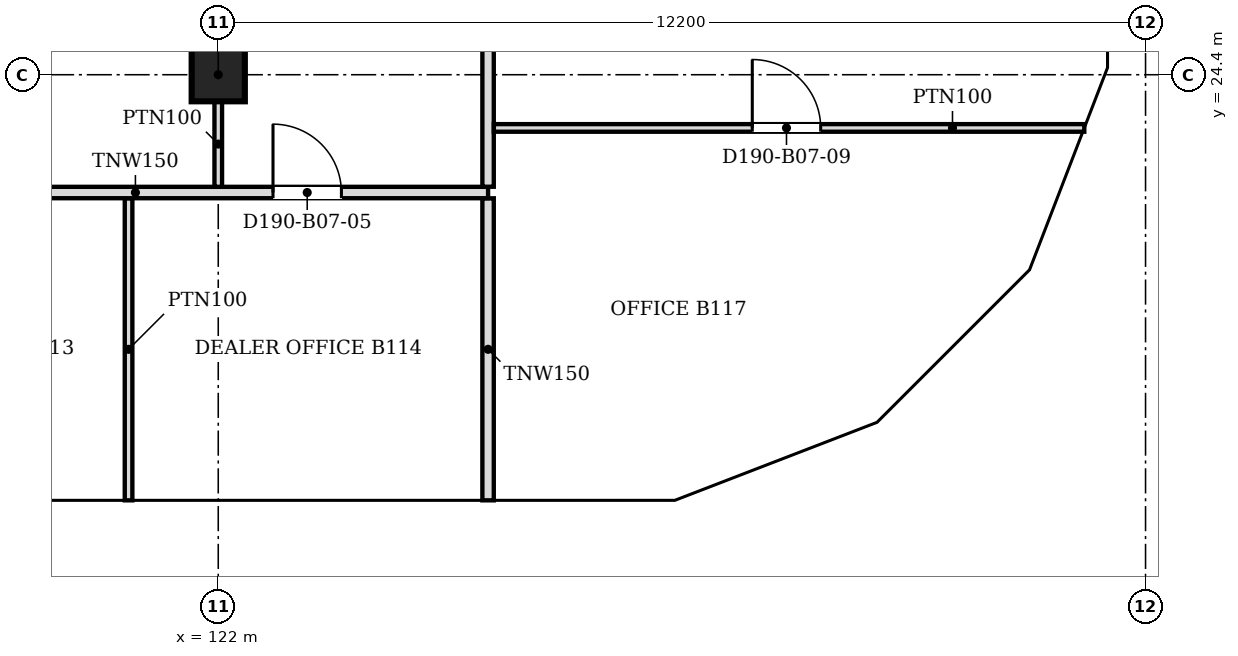
"""IFC4 building model, lengths in metres.
Left out: names, types, materials, properties, quantities, classifications, styles, units other than length and angle.
Written with IfcOpenShell. Run it as: python <this file> out.ifc"""

import sys

from ifc_helpers import new_model, si_unit, direction, frame, frame_2d, origin, origin_2d, place, context, subcontext, project, spatial, polyline, rectangle, outline, extrude, faceted_brep, source, transform, mapped, element, fill, save


model = new_model("IFC4")
c1 = context("Model", 3, precision=1e-05, world=origin(), true_north=direction((0.0, 1.0)))
c2 = subcontext(c1, "Body", "Model", "MODEL_VIEW")
j1 = project(units=[si_unit("LENGTHUNIT", "METRE"), si_unit("PLANEANGLEUNIT", "RADIAN")], contexts=[c1])
p1 = place(None, origin())
s1 = spatial("IfcSite", under=j1, at=p1, CompositionType="ELEMENT")
p2 = place(p1, origin())
s2 = spatial("IfcBuilding", under=s1, at=p2, CompositionType="ELEMENT")
p3 = place(p2, frame((0.0, 0.0, 72.4)))
s3 = spatial("IfcBuildingStorey", under=s2, at=p3, CompositionType="ELEMENT", Elevation=72.4)
p4 = place(p3, frame((122.0, 24.4, 0.0), z_axis=(0.0, 0.0, 1.0), x_axis=(1.0, 0.0, 0.0)))
e1 = element("IfcColumn", 1, at=p4, inside=s3, PredefinedType="COLUMN", context=c2, shape_type="SweptSolid", body=[
    extrude(rectangle(XDim=0.7, YDim=0.7, at=origin_2d()), origin(), (0.0, 0.0, 1.0), 3.6),
])
m1 = source(origin(), c2, "Body", "SweptSolid", [
    extrude(outline(polyline([(3.05, 0.0), (6.1, 3.8), (3.05, 7.6), (0.0, 3.8), (3.05, 0.0)])), frame((0.0, 0.25, 0.0), z_axis=(0.0, -1.0, 0.0), x_axis=(1.0, 0.0, 0.0)), (0.0, 0.0, 1.0), 0.5),
])
p5 = place(p3, frame((115.9, 18.55, -3.8), z_axis=(0.0, 0.0, 1.0), x_axis=(1.0, 0.0, 0.0)))
e2 = element("IfcWall", 2, at=p5, inside=s3, PredefinedType="SOLIDWALL", context=c2, shape_type="MappedRepresentation", body=[
    mapped(m1, transform((0.0, 0.0, 0.0), scale=1.0)),
])
m2 = source(origin(), c2, "Body", "SweptSolid", [
    extrude(outline(polyline([(3.05, 0.399), (5.78, 3.8), (3.05, 7.2), (0.321, 3.8), (3.05, 0.399)])), frame((0.0, 0.26, 0.0), z_axis=(0.0, -1.0, 0.0), x_axis=(1.0, 0.0, 0.0)), (0.0, 0.0, 1.0), 0.52),
])
p6 = place(p5, origin())
e3 = element("IfcOpeningElement", 3, at=p6, cuts=e2, PredefinedType="OPENING", context=c2, shape_type="MappedRepresentation", body=[
    mapped(m2, transform((0.0, 0.0, 0.0), scale=1.0)),
])
m3 = source(origin(), c2, "Body", "Brep", [
    faceted_brep([(3.05, -0.25, 0.0), (6.053, -0.25, 3.8), (3.05, -0.25, 7.6), (0.0, -0.25, 3.8), (0.0, 0.25, 3.8), (3.05, 0.25, 7.6), (6.007, 0.25, 3.859), (6.007, 0.25, 3.741), (3.05, 0.25, 0.0), (6.053, 0.0, 3.8)], [[[0, 1, 2, 3]], [[4, 5, 6, 7, 8]], [[8, 7, 9, 1, 0]], [[6, 5, 2, 1, 9]], [[5, 4, 3, 2]], [[4, 8, 0, 3]], [[9, 7, 6]]]),
])
p7 = place(p3, frame((122.0, 18.55, -3.8), z_axis=(0.0, 0.0, 1.0), x_axis=(1.0, 0.0, 0.0)))
e4 = element("IfcWall", 4, at=p7, inside=s3, PredefinedType="SOLIDWALL", context=c2, shape_type="MappedRepresentation", body=[
    mapped(m3, transform((0.0, 0.0, 0.0), scale=1.0)),
])
m4 = source(origin(), c2, "Body", "SweptSolid", [
    extrude(outline(polyline([(3.049, 0.401), (5.735, 3.8), (3.049, 7.199), (0.321, 3.8), (3.049, 0.401)])), frame((0.0, 0.26, 0.0), z_axis=(0.0, -1.0, 0.0), x_axis=(1.0, 0.0, 0.0)), (0.0, 0.0, 1.0), 0.52),
])
p8 = place(p7, origin())
e5 = element("IfcOpeningElement", 5, at=p8, cuts=e4, PredefinedType="OPENING", context=c2, shape_type="MappedRepresentation", body=[
    mapped(m4, transform((0.0, 0.0, 0.0), scale=1.0)),
])
m5 = source(origin(), c2, "Body", "Brep", [
    faceted_brep([(2.95, -0.25, 0.0), (3.003, -0.25, 0.068), (3.003, -0.25, 7.531), (2.95, -0.25, 7.6), (0.0, -0.25, 3.8), (0.047, 0.25, 3.86), (2.898, 0.25, 7.532), (2.898, 0.25, 0.068), (0.047, 0.25, 3.74), (2.95, 0.0, 0.0), (2.95, 0.0, 7.6), (0.0, 0.0, 3.8)], [[[0, 1, 2, 3, 4]], [[5, 6, 7, 8]], [[1, 0, 9]], [[10, 3, 2]], [[6, 5, 11, 4, 3, 10]], [[8, 7, 9, 0, 4, 11]], [[8, 11, 5]], [[1, 9, 7, 6, 10, 2]]]),
])
p9 = place(p3, frame((128.053, 18.55, -3.8), z_axis=(0.0, 0.0, 1.0), x_axis=(0.933007896601, 0.359855894603, 0.0)))
e6 = element("IfcWall", 6, at=p9, inside=s3, PredefinedType="SOLIDWALL", context=c2, shape_type="MappedRepresentation", body=[
    mapped(m5, transform((0.0, 0.0, 0.0), scale=1.0)),
])
m6 = source(origin(), c2, "Body", "SweptSolid", [
    extrude(outline(polyline([(2.75, 6.935), (0.316, 3.8), (2.75, 0.665), (2.75, 6.935)])), frame((0.0, 0.26, 0.0), z_axis=(0.0, -1.0, 0.0), x_axis=(1.0, 0.0, 0.0)), (0.0, 0.0, 1.0), 0.52),
])
p10 = place(p9, origin())
e7 = element("IfcOpeningElement", 7, at=p10, cuts=e6, PredefinedType="OPENING", context=c2, shape_type="MappedRepresentation", body=[
    mapped(m6, transform((0.0, 0.0, 0.0), scale=1.0)),
])
m7 = source(origin(), c2, "Body", "Brep", [
    faceted_brep([(0.053, -0.25, 0.0), (2.997, -0.25, 3.8), (0.053, -0.25, 7.6), (0.0, -0.25, 7.532), (0.0, -0.25, 0.068), (0.106, 0.25, 7.531), (2.944, 0.25, 3.868), (2.944, 0.25, 3.732), (0.106, 0.25, 0.068), (2.997, 0.0, 3.8), (0.053, 0.0, 0.0), (0.053, 0.0, 7.6)], [[[0, 1, 2, 3, 4]], [[5, 6, 7, 8]], [[8, 7, 9, 1, 0, 10]], [[6, 5, 11, 2, 1, 9]], [[3, 2, 11]], [[10, 0, 4]], [[8, 10, 4, 3, 11, 5]], [[9, 7, 6]]]),
])
p11 = place(p3, frame((130.769, 19.574, -3.8), z_axis=(0.0, 0.0, 1.0), x_axis=(0.707106781187, 0.707106781187, 0.0)))
e8 = element("IfcWall", 8, at=p11, inside=s3, PredefinedType="SOLIDWALL", context=c2, shape_type="MappedRepresentation", body=[
    mapped(m7, transform((0.0, 0.0, 0.0), scale=1.0)),
])
m8 = source(origin(), c2, "Body", "SweptSolid", [
    extrude(outline(polyline([(0.253, 0.666), (2.681, 3.8), (0.253, 6.934), (0.253, 0.666)])), frame((0.0, 0.26, 0.0), z_axis=(0.0, -1.0, 0.0), x_axis=(1.0, 0.0, 0.0)), (0.0, 0.0, 1.0), 0.52),
])
p12 = place(p11, origin())
e9 = element("IfcOpeningElement", 9, at=p12, cuts=e8, PredefinedType="OPENING", context=c2, shape_type="MappedRepresentation", body=[
    mapped(m8, transform((0.0, 0.0, 0.0), scale=1.0)),
])
m9 = source(origin(), c2, "Body", "Brep", [
    faceted_brep([(2.95, -0.25, 0.0), (2.997, -0.25, 0.059), (2.997, -0.25, 7.541), (2.95, -0.25, 7.6), (0.0, -0.25, 3.8), (0.053, 0.25, 3.868), (2.904, 0.25, 7.54), (2.904, 0.25, 0.06), (0.053, 0.25, 3.732), (2.95, 0.0, 0.0), (2.95, 0.0, 7.6), (0.0, 0.0, 3.8)], [[[0, 1, 2, 3, 4]], [[5, 6, 7, 8]], [[1, 0, 9]], [[10, 3, 2]], [[6, 5, 11, 4, 3, 10]], [[8, 7, 9, 0, 4, 11]], [[8, 11, 5]], [[1, 9, 7, 6, 10, 2]]]),
])
p13 = place(p3, frame((132.888, 21.694, -3.8), z_axis=(0.0, 0.0, 1.0), x_axis=(0.359901446078, 0.932990326376, 0.0)))
e10 = element("IfcWall", 10, at=p13, inside=s3, PredefinedType="SOLIDWALL", context=c2, shape_type="MappedRepresentation", body=[
    mapped(m9, transform((0.0, 0.0, 0.0), scale=1.0)),
])
p14 = place(p13, origin())
e11 = element("IfcOpeningElement", 11, at=p14, cuts=e10, PredefinedType="OPENING", context=c2, shape_type="MappedRepresentation", body=[
    mapped(m6, transform((0.0, 0.0, 0.0), scale=1.0)),
])
m10 = source(origin(), c2, "Body", "Brep", [
    faceted_brep([(0.047, -0.25, 0.0), (3.05, -0.25, 3.8), (0.047, -0.25, 7.6), (0.0, -0.25, 7.54), (0.0, -0.25, 0.06), (0.093, 0.25, 7.541), (3.05, 0.25, 3.8), (0.093, 0.25, 0.059), (0.047, 0.0, 0.0), (0.047, 0.0, 7.6)], [[[0, 1, 2, 3, 4]], [[5, 6, 7]], [[7, 6, 1, 0, 8]], [[6, 5, 9, 2, 1]], [[3, 2, 9]], [[8, 0, 4]], [[7, 8, 4, 3, 9, 5]]]),
])
p15 = place(p3, frame((133.95, 24.4, -3.8), z_axis=(0.0, 0.0, 1.0), x_axis=(0.0, 1.0, 0.0)))
e12 = element("IfcWall", 12, at=p15, inside=s3, PredefinedType="SOLIDWALL", context=c2, shape_type="MappedRepresentation", body=[
    mapped(m10, transform((0.0, 0.0, 0.0), scale=1.0)),
])
m11 = source(origin(), c2, "Body", "SweptSolid", [
    extrude(outline(polyline([(0.247, 0.656), (2.731, 3.8), (0.247, 6.944), (0.247, 0.656)])), frame((0.0, 0.26, 0.0), z_axis=(0.0, -1.0, 0.0), x_axis=(1.0, 0.0, 0.0)), (0.0, 0.0, 1.0), 0.52),
])
p16 = place(p15, origin())
e13 = element("IfcOpeningElement", 13, at=p16, cuts=e12, PredefinedType="OPENING", context=c2, shape_type="MappedRepresentation", body=[
    mapped(m11, transform((0.0, 0.0, 0.0), scale=1.0)),
])
p17 = place(p2, frame((0.0, 0.0, 76.2)))
s4 = spatial("IfcBuildingStorey", under=s2, at=p17, CompositionType="ELEMENT", Elevation=76.2)
m12 = source(origin(), c2, "Body", "SweptSolid", [
    extrude(outline(polyline([(3.05, 0.0), (6.1, 3.8), (3.05, 7.6), (0.0, 3.8), (3.05, 0.0)])), frame((0.0, 0.25, 0.0), z_axis=(0.0, -1.0, 0.0), x_axis=(1.0, 0.0, 0.0)), (0.0, 0.0, 1.0), 0.5),
])
p18 = place(p17, frame((118.95, 18.55, -3.8), z_axis=(0.0, 0.0, 1.0), x_axis=(1.0, 0.0, 0.0)))
e14 = element("IfcWall", 14, at=p18, inside=s4, PredefinedType="SOLIDWALL", context=c2, shape_type="MappedRepresentation", body=[
    mapped(m12, transform((0.0, 0.0, 0.0), scale=1.0)),
])
m13 = source(origin(), c2, "Body", "SweptSolid", [
    extrude(outline(polyline([(3.05, 0.399), (5.78, 3.8), (3.05, 7.201), (0.321, 3.8), (3.05, 0.399)])), frame((0.0, 0.26, 0.0), z_axis=(0.0, -1.0, 0.0), x_axis=(1.0, 0.0, 0.0)), (0.0, 0.0, 1.0), 0.52),
])
p19 = place(p18, origin())
e15 = element("IfcOpeningElement", 15, at=p19, cuts=e14, PredefinedType="OPENING", context=c2, shape_type="MappedRepresentation", body=[
    mapped(m13, transform((0.0, 0.0, 0.0), scale=1.0)),
])
m14 = source(origin(), c2, "Body", "Brep", [
    faceted_brep([(3.003, -0.25, 0.0), (3.05, -0.25, 0.06), (3.05, -0.25, 7.54), (3.003, -0.25, 7.6), (0.0, -0.25, 3.8), (0.0, 0.25, 3.8), (2.957, 0.25, 7.541), (2.957, 0.25, 0.059), (3.003, 0.0, 0.0), (3.003, 0.0, 7.6)], [[[0, 1, 2, 3, 4]], [[5, 6, 7]], [[1, 0, 8]], [[9, 3, 2]], [[6, 5, 4, 3, 9]], [[5, 7, 8, 0, 4]], [[1, 8, 7, 6, 9, 2]]]),
])
p20 = place(p17, frame((125.05, 18.55, -3.8), z_axis=(0.0, 0.0, 1.0), x_axis=(1.0, 0.0, 0.0)))
e16 = element("IfcWall", 16, at=p20, inside=s4, PredefinedType="SOLIDWALL", context=c2, shape_type="MappedRepresentation", body=[
    mapped(m14, transform((0.0, 0.0, 0.0), scale=1.0)),
])
m15 = source(origin(), c2, "Body", "SweptSolid", [
    extrude(outline(polyline([(2.803, 6.944), (0.319, 3.8), (2.803, 0.656), (2.803, 6.944)])), frame((0.0, 0.26, 0.0), z_axis=(0.0, -1.0, 0.0), x_axis=(1.0, 0.0, 0.0)), (0.0, 0.0, 1.0), 0.52),
])
p21 = place(p20, origin())
e17 = element("IfcOpeningElement", 17, at=p21, cuts=e16, PredefinedType="OPENING", context=c2, shape_type="MappedRepresentation", body=[
    mapped(m15, transform((0.0, 0.0, 0.0), scale=1.0)),
])
m16 = source(origin(), c2, "Body", "Brep", [
    faceted_brep([(0.047, -0.25, 0.0), (2.997, -0.25, 3.8), (0.047, -0.25, 7.6), (0.0, -0.25, 7.541), (0.0, -0.25, 0.059), (0.093, 0.25, 7.54), (2.944, 0.25, 3.868), (2.944, 0.25, 3.732), (0.093, 0.25, 0.06), (2.997, 0.0, 3.8), (0.047, 0.0, 0.0), (0.047, 0.0, 7.6)], [[[0, 1, 2, 3, 4]], [[5, 6, 7, 8]], [[8, 7, 9, 1, 0, 10]], [[6, 5, 11, 2, 1, 9]], [[3, 2, 11]], [[10, 0, 4]], [[8, 10, 4, 3, 11, 5]], [[9, 7, 6]]]),
])
p22 = place(p17, frame((128.01, 18.533, -3.8), z_axis=(0.0, 0.0, 1.0), x_axis=(0.932990326376, 0.359901446078, 0.0)))
e18 = element("IfcWall", 18, at=p22, inside=s4, PredefinedType="SOLIDWALL", context=c2, shape_type="MappedRepresentation", body=[
    mapped(m16, transform((0.0, 0.0, 0.0), scale=1.0)),
])
m17 = source(origin(), c2, "Body", "SweptSolid", [
    extrude(outline(polyline([(0.247, 0.665), (2.681, 3.8), (0.247, 6.935), (0.247, 0.665)])), frame((0.0, 0.26, 0.0), z_axis=(0.0, -1.0, 0.0), x_axis=(1.0, 0.0, 0.0)), (0.0, 0.0, 1.0), 0.52),
])
p23 = place(p22, origin())
e19 = element("IfcOpeningElement", 19, at=p23, cuts=e18, PredefinedType="OPENING", context=c2, shape_type="MappedRepresentation", body=[
    mapped(m17, transform((0.0, 0.0, 0.0), scale=1.0)),
])
m18 = source(origin(), c2, "Body", "Brep", [
    faceted_brep([(2.944, -0.25, 0.0), (2.997, -0.25, 0.068), (2.997, -0.25, 7.532), (2.944, -0.25, 7.6), (0.0, -0.25, 3.8), (0.053, 0.25, 3.868), (2.891, 0.25, 7.532), (2.891, 0.25, 0.068), (0.053, 0.25, 3.732), (2.944, 0.0, 0.0), (2.944, 0.0, 7.6), (0.0, 0.0, 3.8)], [[[0, 1, 2, 3, 4]], [[5, 6, 7, 8]], [[1, 0, 9]], [[10, 3, 2]], [[6, 5, 11, 4, 3, 10]], [[8, 7, 9, 0, 4, 11]], [[8, 11, 5]], [[1, 9, 7, 6, 10, 2]]]),
])
p24 = place(p17, frame((130.806, 19.612, -3.8), z_axis=(0.0, 0.0, 1.0), x_axis=(0.707106781187, 0.707106781187, 0.0)))
e20 = element("IfcWall", 20, at=p24, inside=s4, PredefinedType="SOLIDWALL", context=c2, shape_type="MappedRepresentation", body=[
    mapped(m18, transform((0.0, 0.0, 0.0), scale=1.0)),
])
m19 = source(origin(), c2, "Body", "SweptSolid", [
    extrude(outline(polyline([(2.744, 6.934), (0.316, 3.8), (2.744, 0.667), (2.744, 6.934)])), frame((0.0, 0.26, 0.0), z_axis=(0.0, -1.0, 0.0), x_axis=(1.0, 0.0, 0.0)), (0.0, 0.0, 1.0), 0.52),
])
p25 = place(p24, origin())
e21 = element("IfcOpeningElement", 21, at=p25, cuts=e20, PredefinedType="OPENING", context=c2, shape_type="MappedRepresentation", body=[
    mapped(m19, transform((0.0, 0.0, 0.0), scale=1.0)),
])
m20 = source(origin(), c2, "Body", "Brep", [
    faceted_brep([(0.053, -0.25, 0.0), (3.003, -0.25, 3.8), (0.053, -0.25, 7.6), (0.0, -0.25, 7.532), (0.0, -0.25, 0.068), (0.106, 0.25, 7.532), (2.957, 0.25, 3.86), (2.957, 0.25, 3.74), (0.106, 0.25, 0.068), (3.003, 0.0, 3.8), (0.053, 0.0, 0.0), (0.053, 0.0, 7.6)], [[[0, 1, 2, 3, 4]], [[5, 6, 7, 8]], [[8, 7, 9, 1, 0, 10]], [[6, 5, 11, 2, 1, 9]], [[3, 2, 11]], [[10, 0, 4]], [[8, 10, 4, 3, 11, 5]], [[9, 7, 6]]]),
])
p26 = place(p17, frame((132.869, 21.644, -3.8), z_axis=(0.0, 0.0, 1.0), x_axis=(0.359855894603, 0.933007896601, 0.0)))
e22 = element("IfcWall", 22, at=p26, inside=s4, PredefinedType="SOLIDWALL", context=c2, shape_type="MappedRepresentation", body=[
    mapped(m20, transform((0.0, 0.0, 0.0), scale=1.0)),
])
m21 = source(origin(), c2, "Body", "SweptSolid", [
    extrude(outline(polyline([(0.253, 0.665), (2.687, 3.8), (0.253, 6.935), (0.253, 0.665)])), frame((0.0, 0.26, 0.0), z_axis=(0.0, -1.0, 0.0), x_axis=(1.0, 0.0, 0.0)), (0.0, 0.0, 1.0), 0.52),
])
p27 = place(p26, origin())
e23 = element("IfcOpeningElement", 23, at=p27, cuts=e22, PredefinedType="OPENING", context=c2, shape_type="MappedRepresentation", body=[
    mapped(m21, transform((0.0, 0.0, 0.0), scale=1.0)),
])
m22 = source(origin(), c2, "Body", "Brep", [
    faceted_brep([(3.003, -0.25, 0.0), (6.053, -0.25, 3.8), (3.003, -0.25, 7.6), (0.0, -0.25, 3.8), (0.047, 0.25, 3.859), (3.003, 0.25, 7.6), (6.053, 0.25, 3.8), (3.003, 0.25, 0.0), (0.047, 0.25, 3.741), (0.0, 0.0, 3.8)], [[[0, 1, 2, 3]], [[4, 5, 6, 7, 8]], [[7, 6, 1, 0]], [[6, 5, 2, 1]], [[5, 4, 9, 3, 2]], [[8, 7, 0, 3, 9]], [[8, 9, 4]]]),
])
p28 = place(p17, frame((133.95, 24.447, -3.8), z_axis=(0.0, 0.0, 1.0), x_axis=(0.0, 1.0, 0.0)))
e24 = element("IfcWall", 24, at=p28, inside=s4, PredefinedType="SOLIDWALL", context=c2, shape_type="MappedRepresentation", body=[
    mapped(m22, transform((0.0, 0.0, 0.0), scale=1.0)),
])
m23 = source(origin(), c2, "Body", "SweptSolid", [
    extrude(outline(polyline([(3.005, 0.401), (5.733, 3.8), (3.005, 7.199), (0.319, 3.8), (3.005, 0.401)])), frame((0.0, 0.26, 0.0), z_axis=(0.0, -1.0, 0.0), x_axis=(1.0, 0.0, 0.0)), (0.0, 0.0, 1.0), 0.52),
])
p29 = place(p28, origin())
e25 = element("IfcOpeningElement", 25, at=p29, cuts=e24, PredefinedType="OPENING", context=c2, shape_type="MappedRepresentation", body=[
    mapped(m23, transform((0.0, 0.0, 0.0), scale=1.0)),
])
p30 = place(p3, frame((120.82, 18.8, 0.0), z_axis=(0.0, 0.0, 1.0), x_axis=(0.0, 1.0, 0.0)))
e26 = element("IfcWall", 26, at=p30, inside=s3, PredefinedType="PARTITIONING", context=c2, shape_type="SweptSolid", body=[
    extrude(rectangle(XDim=3.974, YDim=0.1, at=frame_2d((1.987, 0.0))), origin(), (0.0, 0.0, 1.0), 3.067),
])
p31 = place(p3, frame((125.55, 18.8, 0.0), z_axis=(0.0, 0.0, 1.0), x_axis=(0.0, 1.0, 0.0)))
e27 = element("IfcWall", 27, at=p31, inside=s3, PredefinedType="PARTITIONING", context=c2, shape_type="SweptSolid", body=[
    extrude(rectangle(XDim=3.974, YDim=0.15, at=frame_2d((1.987, 0.0))), origin(), (0.0, 0.0, 1.0), 3.067),
])
p32 = place(p3, frame((125.55, 22.85, 0.0), z_axis=(0.0, 0.0, 1.0), x_axis=(-1.0, 0.0, 0.0)))
e28 = element("IfcWall", 28, at=p32, inside=s3, PredefinedType="PARTITIONING", context=c2, shape_type="SweptSolid", body=[
    extrude(rectangle(XDim=9.15, YDim=0.15, at=frame_2d((4.575, 0.0))), origin(), (0.0, 0.0, 1.0), 3.067),
])
m24 = source(origin(), c2, "Body", "SweptSolid", [
    extrude(rectangle(XDim=0.9, YDim=2.1, at=frame_2d((0.45, 1.05))), frame((0.0, 0.085, 0.0), z_axis=(0.0, -1.0, 0.0), x_axis=(1.0, 0.0, 0.0)), (0.0, 0.0, 1.0), 0.17),
])
p33 = place(p32, frame((6.45, 0.0, 0.0)))
e29 = element("IfcOpeningElement", 29, at=p33, cuts=e28, PredefinedType="OPENING", context=c2, shape_type="MappedRepresentation", body=[
    mapped(m24, transform((0.0, 0.0, 0.0), scale=1.0)),
])
p34 = place(p32, frame((1.93, 0.0, 0.0)))
e30 = element("IfcOpeningElement", 30, at=p34, cuts=e28, PredefinedType="OPENING", context=c2, shape_type="MappedRepresentation", body=[
    mapped(m24, transform((0.0, 0.0, 0.0), scale=1.0)),
])
p35 = place(p3, frame((125.55, 22.926, 0.0), z_axis=(0.0, 0.0, 1.0), x_axis=(0.0, 1.0, 0.0)))
e31 = element("IfcWall", 31, at=p35, inside=s3, PredefinedType="PARTITIONING", context=c2, shape_type="SweptSolid", body=[
    extrude(rectangle(XDim=7.823, YDim=0.15, at=frame_2d((3.912, 0.0))), origin(), (0.0, 0.0, 1.0), 3.067),
])
p36 = place(p3, frame((133.394, 23.7, 0.0), z_axis=(0.0, 0.0, 1.0), x_axis=(-1.0, 0.0, 0.0)))
e32 = element("IfcWall", 32, at=p36, inside=s3, PredefinedType="PARTITIONING", context=c2, shape_type="SweptSolid", body=[
    extrude(rectangle(XDim=7.768, YDim=0.1, at=frame_2d((3.884, 0.0))), origin(), (0.0, 0.0, 1.0), 3.067),
])
m25 = source(origin(), c2, "Body", "SweptSolid", [
    extrude(rectangle(XDim=0.9, YDim=2.1, at=frame_2d((0.45, 1.05))), frame((0.0, 0.06, 0.0), z_axis=(0.0, -1.0, 0.0), x_axis=(1.0, 0.0, 0.0)), (0.0, 0.0, 1.0), 0.12),
])
p37 = place(p36, frame((3.468, 0.0, 0.0)))
e33 = element("IfcOpeningElement", 33, at=p37, cuts=e32, PredefinedType="OPENING", context=c2, shape_type="MappedRepresentation", body=[
    mapped(m25, transform((0.0, 0.0, 0.0), scale=1.0)),
])
p38 = place(p3, frame((122.0, 24.05, 0.0), z_axis=(0.0, 0.0, 1.0), x_axis=(0.0, -1.0, 0.0)))
e34 = element("IfcWall", 34, at=p38, inside=s3, PredefinedType="PARTITIONING", context=c2, shape_type="SweptSolid", body=[
    extrude(rectangle(XDim=1.125, YDim=0.1, at=frame_2d((0.562, 0.0))), origin(), (0.0, 0.0, 1.0), 3.067),
])
m26 = source(origin(), c2, "Body", "SweptSolid", [
    extrude(rectangle(XDim=0.9, YDim=2.1, at=frame_2d((0.45, 1.05))), frame((0.0, 0.025, 0.0), z_axis=(0.0, -1.0, 0.0), x_axis=(1.0, 0.0, 0.0)), (0.0, 0.0, 1.0), 0.05),
])
p39 = place(p34, origin())
e35 = element("IfcDoor", 35, at=p39, inside=s3, OperationType="SINGLE_SWING_RIGHT", PredefinedType="DOOR", context=c2, shape_type="MappedRepresentation", body=[
    mapped(m26, transform((0.0, 0.0, 0.0), scale=1.0)),
])
fill(e30, e35)
p40 = place(p37, origin())
e36 = element("IfcDoor", 36, at=p40, inside=s3, OperationType="SINGLE_SWING_RIGHT", PredefinedType="DOOR", context=c2, shape_type="MappedRepresentation", body=[
    mapped(m26, transform((0.0, 0.0, 0.0), scale=1.0)),
])
fill(e33, e36)
save(model, sys.argv[1])
